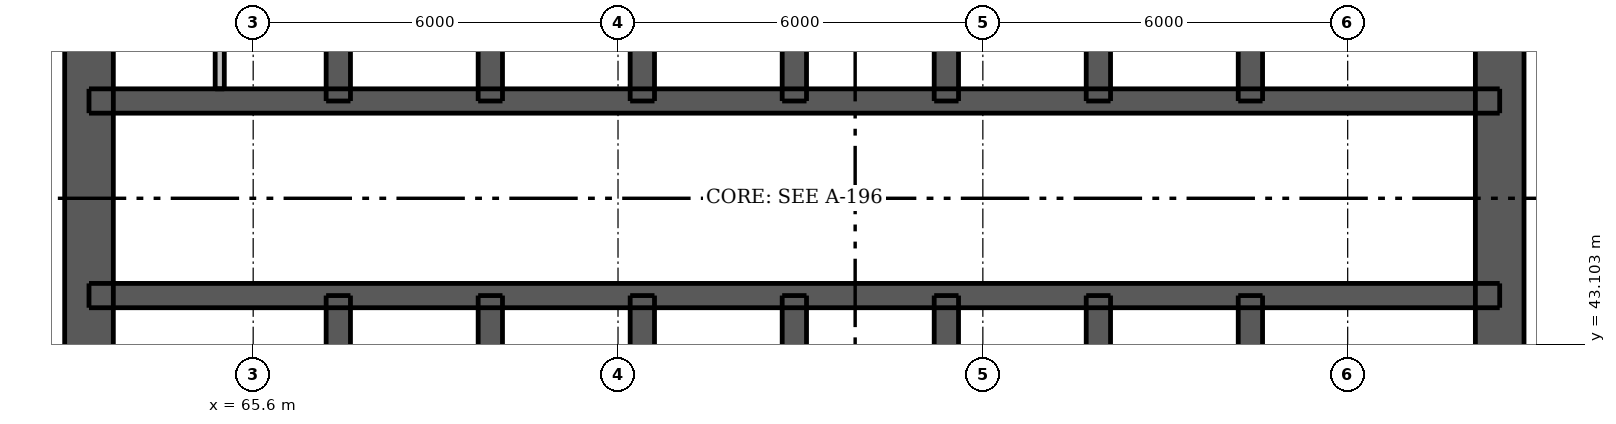
"""IFC4 building model, lengths in metres.
Left out: names, types, materials, properties, quantities, classifications, styles, units other than length and angle.
Written with IfcOpenShell. Run it as: python <this file> out.ifc"""

import sys

from ifc_helpers import new_model, si_unit, direction, frame, frame_2d, origin, place, context, subcontext, project, spatial, rectangle, extrude, element, fill, save


model = new_model("IFC4")
c1 = context("Model", 3, precision=1e-05, world=origin(), true_north=direction((0.0, 1.0)))
c2 = subcontext(c1, "Body", "Model", "MODEL_VIEW")
j1 = project(units=[si_unit("LENGTHUNIT", "METRE"), si_unit("PLANEANGLEUNIT", "RADIAN")], contexts=[c1])
p1 = place(None, origin())
s1 = spatial("IfcSite", under=j1, at=p1, CompositionType="ELEMENT")
p2 = place(p1, origin())
s2 = spatial("IfcBuilding", under=s1, at=p2, CompositionType="ELEMENT")
p3 = place(p2, frame((0.0, 0.0, 121.6)))
s3 = spatial("IfcBuildingStorey", under=s2, at=p3, CompositionType="ELEMENT", Elevation=121.6)
p4 = place(p3, frame((62.9, 33.5, 0.0), z_axis=(0.0, 0.0, 1.0), x_axis=(0.0, 1.0, 0.0)))
e1 = element("IfcWall", 1, at=p4, inside=s3, PredefinedType="SHEAR", context=c2, shape_type="SweptSolid", body=[
    extrude(rectangle(XDim=24.0, YDim=0.8, at=frame_2d((12.0, 0.0))), origin(), (0.0, 0.0, 1.0), 2.95),
])
p5 = place(p4, frame((11.2, 0.0, 0.0)))
e2 = element("IfcOpeningElement", 2, at=p5, cuts=e1, PredefinedType="OPENING", context=c2, shape_type="SweptSolid", body=[
    extrude(rectangle(XDim=1.6, YDim=2.1, at=frame_2d((0.8, 1.05))), frame((0.0, 0.41, 0.0), z_axis=(0.0, -1.0, 0.0), x_axis=(1.0, 0.0, 0.0)), (0.0, 0.0, 1.0), 0.82),
])
p6 = place(p3, frame((86.1, 33.5, 0.0), z_axis=(0.0, 0.0, 1.0), x_axis=(0.0, 1.0, 0.0)))
e3 = element("IfcWall", 3, at=p6, inside=s3, PredefinedType="SHEAR", context=c2, shape_type="SweptSolid", body=[
    extrude(rectangle(XDim=24.0, YDim=0.8, at=frame_2d((12.0, 0.0))), origin(), (0.0, 0.0, 1.0), 2.95),
])
p7 = place(p6, frame((11.2, 0.0, 0.0)))
e4 = element("IfcOpeningElement", 4, at=p7, cuts=e3, PredefinedType="OPENING", context=c2, shape_type="SweptSolid", body=[
    extrude(rectangle(XDim=1.6, YDim=2.1, at=frame_2d((0.8, 1.05))), frame((0.0, 0.41, 0.0), z_axis=(0.0, -1.0, 0.0), x_axis=(1.0, 0.0, 0.0)), (0.0, 0.0, 1.0), 0.82),
])
p8 = place(p3, frame((62.9, 43.9, 0.0), z_axis=(0.0, 0.0, 1.0), x_axis=(1.0, 0.0, 0.0)))
e5 = element("IfcWall", 5, at=p8, inside=s3, PredefinedType="SHEAR", context=c2, shape_type="SweptSolid", body=[
    extrude(rectangle(XDim=23.2, YDim=0.4, at=frame_2d((11.6, 0.0))), origin(), (0.0, 0.0, 1.0), 2.95),
])
p9 = place(p8, frame((1.7, 0.0, 0.0)))
e6 = element("IfcOpeningElement", 6, at=p9, cuts=e5, PredefinedType="OPENING", context=c2, shape_type="SweptSolid", body=[
    extrude(rectangle(XDim=0.9, YDim=2.1, at=frame_2d((0.45, 1.05))), frame((0.0, 0.21, 0.0), z_axis=(0.0, -1.0, 0.0), x_axis=(1.0, 0.0, 0.0)), (0.0, 0.0, 1.0), 0.42),
])
p10 = place(p8, frame((20.6, 0.0, 0.0)))
e7 = element("IfcOpeningElement", 7, at=p10, cuts=e5, PredefinedType="OPENING", context=c2, shape_type="SweptSolid", body=[
    extrude(rectangle(XDim=0.9, YDim=2.1, at=frame_2d((0.45, 1.05))), frame((0.0, 0.21, 0.0), z_axis=(0.0, -1.0, 0.0), x_axis=(1.0, 0.0, 0.0)), (0.0, 0.0, 1.0), 0.42),
])
p11 = place(p8, frame((4.8, 0.0, 0.0)))
e8 = element("IfcOpeningElement", 8, at=p11, cuts=e5, PredefinedType="OPENING", context=c2, shape_type="SweptSolid", body=[
    extrude(rectangle(XDim=1.1, YDim=2.1, at=frame_2d((0.55, 1.05))), frame((0.0, 0.21, 0.0), z_axis=(0.0, -1.0, 0.0), x_axis=(1.0, 0.0, 0.0)), (0.0, 0.0, 1.0), 0.42),
])
p12 = place(p8, frame((7.3, 0.0, 0.0)))
e9 = element("IfcOpeningElement", 9, at=p12, cuts=e5, PredefinedType="OPENING", context=c2, shape_type="SweptSolid", body=[
    extrude(rectangle(XDim=1.1, YDim=2.1, at=frame_2d((0.55, 1.05))), frame((0.0, 0.21, 0.0), z_axis=(0.0, -1.0, 0.0), x_axis=(1.0, 0.0, 0.0)), (0.0, 0.0, 1.0), 0.42),
])
p13 = place(p8, frame((9.8, 0.0, 0.0)))
e10 = element("IfcOpeningElement", 10, at=p13, cuts=e5, PredefinedType="OPENING", context=c2, shape_type="SweptSolid", body=[
    extrude(rectangle(XDim=1.1, YDim=2.1, at=frame_2d((0.55, 1.05))), frame((0.0, 0.21, 0.0), z_axis=(0.0, -1.0, 0.0), x_axis=(1.0, 0.0, 0.0)), (0.0, 0.0, 1.0), 0.42),
])
p14 = place(p8, frame((12.3, 0.0, 0.0)))
e11 = element("IfcOpeningElement", 11, at=p14, cuts=e5, PredefinedType="OPENING", context=c2, shape_type="SweptSolid", body=[
    extrude(rectangle(XDim=1.1, YDim=2.1, at=frame_2d((0.55, 1.05))), frame((0.0, 0.21, 0.0), z_axis=(0.0, -1.0, 0.0), x_axis=(1.0, 0.0, 0.0)), (0.0, 0.0, 1.0), 0.42),
])
p15 = place(p8, frame((14.8, 0.0, 0.0)))
e12 = element("IfcOpeningElement", 12, at=p15, cuts=e5, PredefinedType="OPENING", context=c2, shape_type="SweptSolid", body=[
    extrude(rectangle(XDim=1.1, YDim=2.1, at=frame_2d((0.55, 1.05))), frame((0.0, 0.21, 0.0), z_axis=(0.0, -1.0, 0.0), x_axis=(1.0, 0.0, 0.0)), (0.0, 0.0, 1.0), 0.42),
])
p16 = place(p8, frame((17.3, 0.0, 0.0)))
e13 = element("IfcOpeningElement", 13, at=p16, cuts=e5, PredefinedType="OPENING", context=c2, shape_type="SweptSolid", body=[
    extrude(rectangle(XDim=1.1, YDim=2.1, at=frame_2d((0.55, 1.05))), frame((0.0, 0.21, 0.0), z_axis=(0.0, -1.0, 0.0), x_axis=(1.0, 0.0, 0.0)), (0.0, 0.0, 1.0), 0.42),
])
p17 = place(p3, frame((62.9, 47.1, 0.0), z_axis=(0.0, 0.0, 1.0), x_axis=(1.0, 0.0, 0.0)))
e14 = element("IfcWall", 14, at=p17, inside=s3, PredefinedType="SHEAR", context=c2, shape_type="SweptSolid", body=[
    extrude(rectangle(XDim=23.2, YDim=0.4, at=frame_2d((11.6, 0.0))), origin(), (0.0, 0.0, 1.0), 2.95),
])
p18 = place(p17, frame((0.825, 0.0, 0.0)))
e15 = element("IfcOpeningElement", 15, at=p18, cuts=e14, PredefinedType="OPENING", context=c2, shape_type="SweptSolid", body=[
    extrude(rectangle(XDim=0.9, YDim=2.1, at=frame_2d((0.45, 1.05))), frame((0.0, 0.21, 0.0), z_axis=(0.0, -1.0, 0.0), x_axis=(1.0, 0.0, 0.0)), (0.0, 0.0, 1.0), 0.42),
])
p19 = place(p17, frame((2.575, 0.0, 0.0)))
e16 = element("IfcOpeningElement", 16, at=p19, cuts=e14, PredefinedType="OPENING", context=c2, shape_type="SweptSolid", body=[
    extrude(rectangle(XDim=0.9, YDim=2.1, at=frame_2d((0.45, 1.05))), frame((0.0, 0.21, 0.0), z_axis=(0.0, -1.0, 0.0), x_axis=(1.0, 0.0, 0.0)), (0.0, 0.0, 1.0), 0.42),
])
p20 = place(p17, frame((20.6, 0.0, 0.0)))
e17 = element("IfcOpeningElement", 17, at=p20, cuts=e14, PredefinedType="OPENING", context=c2, shape_type="SweptSolid", body=[
    extrude(rectangle(XDim=0.9, YDim=2.1, at=frame_2d((0.45, 1.05))), frame((0.0, 0.21, 0.0), z_axis=(0.0, -1.0, 0.0), x_axis=(1.0, 0.0, 0.0)), (0.0, 0.0, 1.0), 0.42),
])
p21 = place(p3, frame((67.0, 33.9, 0.0), z_axis=(0.0, 0.0, 1.0), x_axis=(0.0, 1.0, 0.0)))
e18 = element("IfcWall", 18, at=p21, inside=s3, PredefinedType="SHEAR", context=c2, shape_type="SweptSolid", body=[
    extrude(rectangle(XDim=10.0, YDim=0.4, at=frame_2d((5.0, 0.0))), origin(), (0.0, 0.0, 1.0), 2.95),
])
p22 = place(p21, frame((0.6, 0.0, 0.0)))
e19 = element("IfcOpeningElement", 19, at=p22, cuts=e18, PredefinedType="OPENING", context=c2, shape_type="SweptSolid", body=[
    extrude(rectangle(XDim=1.1, YDim=2.1, at=frame_2d((0.55, 1.05))), frame((0.0, 0.21, 0.0), z_axis=(0.0, -1.0, 0.0), x_axis=(1.0, 0.0, 0.0)), (0.0, 0.0, 1.0), 0.42),
])
for number, where, z_axis, x_axis in (
    (20, (67.0, 47.1, 0.0), (0.0, 0.0, 1.0), (0.0, 1.0, 0.0)),
    (21, (82.0, 33.9, 0.0), (0.0, 0.0, 1.0), (0.0, 1.0, 0.0)),
    (22, (82.0, 47.1, 0.0), (0.0, 0.0, 1.0), (0.0, 1.0, 0.0)),
):
    element("IfcWall", number, at=place(p3, frame(where, z_axis=z_axis, x_axis=x_axis)), inside=s3, PredefinedType="SHEAR", context=c2, shape_type="SweptSolid", body=[
        extrude(rectangle(XDim=10.0, YDim=0.4, at=frame_2d((5.0, 0.0))), origin(), (0.0, 0.0, 1.0), 2.95),
    ])
for number, where, z_axis, x_axis in (
    (23, (69.5, 41.0, 0.0), (0.0, 0.0, 1.0), (0.0, 1.0, 0.0)),
    (24, (69.5, 47.1, 0.0), (0.0, 0.0, 1.0), (0.0, 1.0, 0.0)),
    (25, (72.0, 41.0, 0.0), (0.0, 0.0, 1.0), (0.0, 1.0, 0.0)),
    (26, (72.0, 47.1, 0.0), (0.0, 0.0, 1.0), (0.0, 1.0, 0.0)),
    (27, (74.5, 41.0, 0.0), (0.0, 0.0, 1.0), (0.0, 1.0, 0.0)),
    (28, (74.5, 47.1, 0.0), (0.0, 0.0, 1.0), (0.0, 1.0, 0.0)),
    (29, (77.0, 41.0, 0.0), (0.0, 0.0, 1.0), (0.0, 1.0, 0.0)),
    (30, (77.0, 47.1, 0.0), (0.0, 0.0, 1.0), (0.0, 1.0, 0.0)),
    (31, (79.5, 41.0, 0.0), (0.0, 0.0, 1.0), (0.0, 1.0, 0.0)),
    (32, (79.5, 47.1, 0.0), (0.0, 0.0, 1.0), (0.0, 1.0, 0.0)),
):
    element("IfcWall", number, at=place(p3, frame(where, z_axis=z_axis, x_axis=x_axis)), inside=s3, PredefinedType="SHEAR", context=c2, shape_type="SweptSolid", body=[
        extrude(rectangle(XDim=2.9, YDim=0.4, at=frame_2d((1.45, 0.0))), origin(), (0.0, 0.0, 1.0), 2.95),
    ])
p23 = place(p3, frame((65.05, 47.3, 0.0), z_axis=(0.0, 0.0, 1.0), x_axis=(0.0, 1.0, 0.0)))
e33 = element("IfcWall", 33, at=p23, inside=s3, PredefinedType="PLUMBINGWALL", context=c2, shape_type="SweptSolid", body=[
    extrude(rectangle(XDim=2.5, YDim=0.15, at=frame_2d((1.25, 0.0))), origin(), (0.0, 0.0, 1.0), 2.95),
])
p24 = place(p5, origin())
e34 = element("IfcDoor", 34, at=p24, inside=s3, OperationType="DOUBLE_DOOR_SINGLE_SWING", PredefinedType="DOOR", context=c2, shape_type="SweptSolid", body=[
    extrude(rectangle(XDim=1.6, YDim=2.1, at=frame_2d((0.8, 1.05))), frame((0.0, -0.337, 0.0), z_axis=(0.0, -1.0, 0.0), x_axis=(1.0, 0.0, 0.0)), (0.0, 0.0, 1.0), 0.05),
])
fill(e2, e34)
p25 = place(p7, origin())
e35 = element("IfcDoor", 35, at=p25, inside=s3, OperationType="DOUBLE_DOOR_SINGLE_SWING", PredefinedType="DOOR", context=c2, shape_type="SweptSolid", body=[
    extrude(rectangle(XDim=1.6, YDim=2.1, at=frame_2d((0.8, 1.05))), frame((0.0, 0.388, 0.0), z_axis=(0.0, -1.0, 0.0), x_axis=(1.0, 0.0, 0.0)), (0.0, 0.0, 1.0), 0.05),
])
fill(e4, e35)
p26 = place(p9, origin())
e36 = element("IfcDoor", 36, at=p26, inside=s3, OperationType="SINGLE_SWING_LEFT", PredefinedType="DOOR", context=c2, shape_type="SweptSolid", body=[
    extrude(rectangle(XDim=0.9, YDim=2.1, at=frame_2d((0.45, 1.05))), frame((0.0, -0.138, 0.0), z_axis=(0.0, -1.0, 0.0), x_axis=(1.0, 0.0, 0.0)), (0.0, 0.0, 1.0), 0.05),
])
fill(e6, e36)
p27 = place(p10, origin())
e37 = element("IfcDoor", 37, at=p27, inside=s3, OperationType="SINGLE_SWING_LEFT", PredefinedType="DOOR", context=c2, shape_type="SweptSolid", body=[
    extrude(rectangle(XDim=0.9, YDim=2.1, at=frame_2d((0.45, 1.05))), frame((0.0, -0.138, 0.0), z_axis=(0.0, -1.0, 0.0), x_axis=(1.0, 0.0, 0.0)), (0.0, 0.0, 1.0), 0.05),
])
fill(e7, e37)
p28 = place(p18, origin())
e38 = element("IfcDoor", 38, at=p28, inside=s3, OperationType="SINGLE_SWING_LEFT", PredefinedType="DOOR", context=c2, shape_type="SweptSolid", body=[
    extrude(rectangle(XDim=0.9, YDim=2.1, at=frame_2d((0.45, 1.05))), frame((0.0, 0.188, 0.0), z_axis=(0.0, -1.0, 0.0), x_axis=(1.0, 0.0, 0.0)), (0.0, 0.0, 1.0), 0.05),
])
fill(e15, e38)
p29 = place(p19, origin())
e39 = element("IfcDoor", 39, at=p29, inside=s3, OperationType="SINGLE_SWING_RIGHT", PredefinedType="DOOR", context=c2, shape_type="SweptSolid", body=[
    extrude(rectangle(XDim=0.9, YDim=2.1, at=frame_2d((0.45, 1.05))), frame((0.0, 0.188, 0.0), z_axis=(0.0, -1.0, 0.0), x_axis=(1.0, 0.0, 0.0)), (0.0, 0.0, 1.0), 0.05),
])
fill(e16, e39)
p30 = place(p20, origin())
e40 = element("IfcDoor", 40, at=p30, inside=s3, OperationType="SINGLE_SWING_LEFT", PredefinedType="DOOR", context=c2, shape_type="SweptSolid", body=[
    extrude(rectangle(XDim=0.9, YDim=2.1, at=frame_2d((0.45, 1.05))), frame((0.0, 0.188, 0.0), z_axis=(0.0, -1.0, 0.0), x_axis=(1.0, 0.0, 0.0)), (0.0, 0.0, 1.0), 0.05),
])
fill(e17, e40)
p31 = place(p11, origin())
e41 = element("IfcDoor", 41, at=p31, inside=s3, OperationType="DOUBLE_DOOR_SLIDING", PredefinedType="DOOR", context=c2, shape_type="SweptSolid", body=[
    extrude(rectangle(XDim=1.1, YDim=2.1, at=frame_2d((0.55, 1.05))), frame((0.0, 0.025, 0.0), z_axis=(0.0, -1.0, 0.0), x_axis=(1.0, 0.0, 0.0)), (0.0, 0.0, 1.0), 0.05),
])
fill(e8, e41)
p32 = place(p12, origin())
e42 = element("IfcDoor", 42, at=p32, inside=s3, OperationType="DOUBLE_DOOR_SLIDING", PredefinedType="DOOR", context=c2, shape_type="SweptSolid", body=[
    extrude(rectangle(XDim=1.1, YDim=2.1, at=frame_2d((0.55, 1.05))), frame((0.0, 0.025, 0.0), z_axis=(0.0, -1.0, 0.0), x_axis=(1.0, 0.0, 0.0)), (0.0, 0.0, 1.0), 0.05),
])
fill(e9, e42)
p33 = place(p13, origin())
e43 = element("IfcDoor", 43, at=p33, inside=s3, OperationType="DOUBLE_DOOR_SLIDING", PredefinedType="DOOR", context=c2, shape_type="SweptSolid", body=[
    extrude(rectangle(XDim=1.1, YDim=2.1, at=frame_2d((0.55, 1.05))), frame((0.0, 0.025, 0.0), z_axis=(0.0, -1.0, 0.0), x_axis=(1.0, 0.0, 0.0)), (0.0, 0.0, 1.0), 0.05),
])
fill(e10, e43)
p34 = place(p14, origin())
e44 = element("IfcDoor", 44, at=p34, inside=s3, OperationType="DOUBLE_DOOR_SLIDING", PredefinedType="DOOR", context=c2, shape_type="SweptSolid", body=[
    extrude(rectangle(XDim=1.1, YDim=2.1, at=frame_2d((0.55, 1.05))), frame((0.0, 0.025, 0.0), z_axis=(0.0, -1.0, 0.0), x_axis=(1.0, 0.0, 0.0)), (0.0, 0.0, 1.0), 0.05),
])
fill(e11, e44)
p35 = place(p15, origin())
e45 = element("IfcDoor", 45, at=p35, inside=s3, OperationType="DOUBLE_DOOR_SLIDING", PredefinedType="DOOR", context=c2, shape_type="SweptSolid", body=[
    extrude(rectangle(XDim=1.1, YDim=2.1, at=frame_2d((0.55, 1.05))), frame((0.0, 0.025, 0.0), z_axis=(0.0, -1.0, 0.0), x_axis=(1.0, 0.0, 0.0)), (0.0, 0.0, 1.0), 0.05),
])
fill(e12, e45)
p36 = place(p16, origin())
e46 = element("IfcDoor", 46, at=p36, inside=s3, OperationType="DOUBLE_DOOR_SLIDING", PredefinedType="DOOR", context=c2, shape_type="SweptSolid", body=[
    extrude(rectangle(XDim=1.1, YDim=2.1, at=frame_2d((0.55, 1.05))), frame((0.0, 0.025, 0.0), z_axis=(0.0, -1.0, 0.0), x_axis=(1.0, 0.0, 0.0)), (0.0, 0.0, 1.0), 0.05),
])
fill(e13, e46)
save(model, sys.argv[1])
